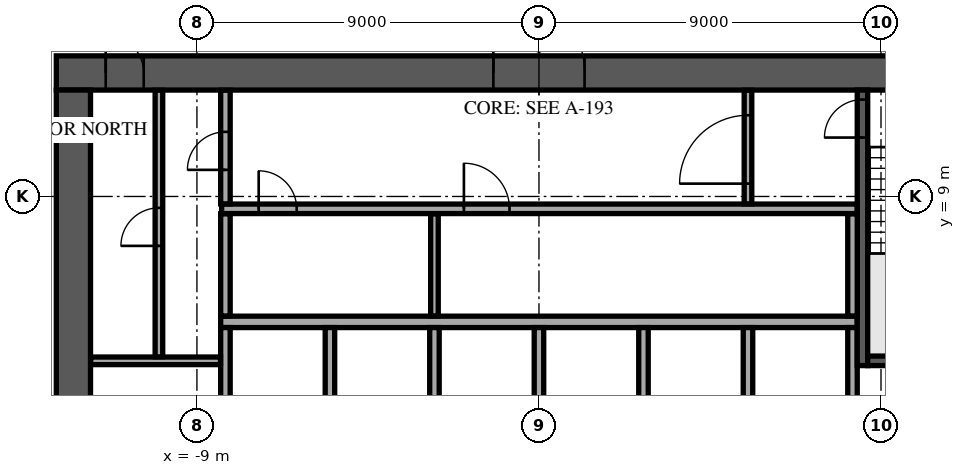
"""IFC4 building model, lengths in metres.
Left out: names, types, materials, properties, quantities, classifications, styles, units other than length and angle.
Written with IfcOpenShell. Run it as: python <this file> out.ifc"""

import sys

from ifc_helpers import new_model, si_unit, direction, frame, frame_2d, origin, place, context, subcontext, project, spatial, rectangle, extrude, element, fill, save


model = new_model("IFC4")
c1 = context("Model", 3, precision=1e-05, world=origin(), true_north=direction((0.0, 1.0)))
c2 = subcontext(c1, "Body", "Model", "MODEL_VIEW")
j1 = project(units=[si_unit("LENGTHUNIT", "METRE"), si_unit("PLANEANGLEUNIT", "RADIAN")], contexts=[c1])
p1 = place(None, origin())
s1 = spatial("IfcSite", under=j1, at=p1, CompositionType="ELEMENT")
p2 = place(p1, origin())
s2 = spatial("IfcBuilding", under=s1, at=p2, CompositionType="ELEMENT")
p3 = place(p2, frame((0.0, 0.0, 225.3)))
s3 = spatial("IfcBuildingStorey", under=s2, at=p3, CompositionType="ELEMENT", Elevation=225.3)
p4 = place(p3, frame((-12.7, 12.25, 0.0), z_axis=(0.0, 0.0, 1.0), x_axis=(1.0, 0.0, 0.0)))
e1 = element("IfcWall", 1, at=p4, inside=s3, PredefinedType="SHEAR", context=c2, shape_type="SweptSolid", body=[
    extrude(rectangle(XDim=25.4, YDim=0.9, at=frame_2d((12.7, 0.0))), origin(), (0.0, 0.0, 1.0), 3.62),
])
p5 = place(p4, frame((11.5, 0.0, 0.0)))
e2 = element("IfcOpeningElement", 2, at=p5, cuts=e1, PredefinedType="OPENING", context=c2, shape_type="SweptSolid", body=[
    extrude(rectangle(XDim=2.4, YDim=2.4, at=frame_2d((1.2, 1.2))), frame((0.0, 0.46, 0.0), z_axis=(0.0, -1.0, 0.0), x_axis=(1.0, 0.0, 0.0)), (0.0, 0.0, 1.0), 0.92),
])
p6 = place(p4, frame((22.325, 0.0, 0.0)))
e3 = element("IfcOpeningElement", 3, at=p6, cuts=e1, PredefinedType="OPENING", context=c2, shape_type="SweptSolid", body=[
    extrude(rectangle(XDim=1.2, YDim=2.1, at=frame_2d((0.6, 1.05))), frame((0.0, 0.46, 0.0), z_axis=(0.0, -1.0, 0.0), x_axis=(1.0, 0.0, 0.0)), (0.0, 0.0, 1.0), 0.92),
])
p7 = place(p4, frame((1.3, 0.0, 0.0)))
e4 = element("IfcOpeningElement", 4, at=p7, cuts=e1, PredefinedType="OPENING", context=c2, shape_type="SweptSolid", body=[
    extrude(rectangle(XDim=1.0, YDim=2.1, at=frame_2d((0.5, 1.05))), frame((0.0, 0.46, 0.0), z_axis=(0.0, -1.0, 0.0), x_axis=(1.0, 0.0, 0.0)), (0.0, 0.0, 1.0), 0.92),
])
p8 = place(p3, frame((-12.25, -11.8, 0.0), z_axis=(0.0, 0.0, 1.0), x_axis=(0.0, 1.0, 0.0)))
e5 = element("IfcWall", 5, at=p8, inside=s3, PredefinedType="SHEAR", context=c2, shape_type="SweptSolid", body=[
    extrude(rectangle(XDim=23.6, YDim=0.9, at=frame_2d((11.8, 0.0))), origin(), (0.0, 0.0, 1.0), 3.62),
])
p9 = place(p8, frame((10.6, 0.0, 0.0)))
e6 = element("IfcOpeningElement", 6, at=p9, cuts=e5, PredefinedType="OPENING", context=c2, shape_type="SweptSolid", body=[
    extrude(rectangle(XDim=2.4, YDim=2.4, at=frame_2d((1.2, 1.2))), frame((0.0, 0.46, 0.0), z_axis=(0.0, -1.0, 0.0), x_axis=(1.0, 0.0, 0.0)), (0.0, 0.0, 1.0), 0.92),
])
p10 = place(p3, frame((-8.375, 5.7, 0.0), z_axis=(0.0, 0.0, 1.0), x_axis=(1.0, 0.0, 0.0)))
e7 = element("IfcWall", 7, at=p10, inside=s3, PredefinedType="SOLIDWALL", context=c2, shape_type="SweptSolid", body=[
    extrude(rectangle(XDim=16.75, YDim=0.3, at=frame_2d((8.375, 0.0))), origin(), (0.0, 0.0, 1.0), 3.62),
])
for number, where, z_axis, x_axis in (
    (8, (-8.25, 2.85, 0.0), (0.0, 0.0, 1.0), (0.0, 1.0, 0.0)),
    (9, (-5.5, 2.85, 0.0), (0.0, 0.0, 1.0), (0.0, 1.0, 0.0)),
    (10, (-2.75, 2.85, 0.0), (0.0, 0.0, 1.0), (0.0, 1.0, 0.0)),
    (11, (0.0, 2.85, 0.0), (0.0, 0.0, 1.0), (0.0, 1.0, 0.0)),
    (12, (2.75, 2.85, 0.0), (0.0, 0.0, 1.0), (0.0, 1.0, 0.0)),
    (13, (5.5, 2.85, 0.0), (0.0, 0.0, 1.0), (0.0, 1.0, 0.0)),
    (14, (8.25, 2.85, 0.0), (0.0, 0.0, 1.0), (0.0, 1.0, 0.0)),
):
    element("IfcWall", number, at=place(p3, frame(where, z_axis=z_axis, x_axis=x_axis)), inside=s3, PredefinedType="SOLIDWALL", context=c2, shape_type="SweptSolid", body=[
        extrude(rectangle(XDim=2.7, YDim=0.25, at=frame_2d((1.35, 0.0))), origin(), (0.0, 0.0, 1.0), 3.62),
    ])
p11 = place(p3, frame((8.512, 4.55, 0.0), z_axis=(0.0, 0.0, 1.0), x_axis=(0.0, 1.0, 0.0)))
e15 = element("IfcWall", 15, at=p11, inside=s3, PredefinedType="SOLIDWALL", context=c2, shape_type="SweptSolid", body=[
    extrude(rectangle(XDim=7.25, YDim=0.275, at=frame_2d((3.625, 0.0))), origin(), (0.0, 0.0, 1.0), 3.62),
])
p12 = place(p11, frame((6.0, 0.0, 0.0)))
e16 = element("IfcOpeningElement", 16, at=p12, cuts=e15, PredefinedType="OPENING", context=c2, shape_type="SweptSolid", body=[
    extrude(rectangle(XDim=1.0, YDim=2.1, at=frame_2d((0.5, 1.05))), frame((0.0, 0.147, 0.0), z_axis=(0.0, -1.0, 0.0), x_axis=(1.0, 0.0, 0.0)), (0.0, 0.0, 1.0), 0.295),
])
p13 = place(p3, frame((8.65, 4.675, 0.0), z_axis=(0.0, 0.0, 1.0), x_axis=(1.0, 0.0, 0.0)))
e17 = element("IfcWall", 17, at=p13, inside=s3, PredefinedType="SOLIDWALL", context=c2, shape_type="SweptSolid", body=[
    extrude(rectangle(XDim=3.15, YDim=0.25, at=frame_2d((1.575, 0.0))), origin(), (0.0, 0.0, 1.0), 3.62),
])
p14 = place(p3, frame((-11.795, 4.675, 0.0), z_axis=(0.0, 0.0, 1.0), x_axis=(1.0, 0.0, 0.0)))
e18 = element("IfcWall", 18, at=p14, inside=s3, PredefinedType="PARTITIONING", context=c2, shape_type="SweptSolid", body=[
    extrude(rectangle(XDim=3.415, YDim=0.2, at=frame_2d((1.708, 0.0))), origin(), (0.0, 0.0, 1.0), 3.62),
])
p15 = place(p3, frame((-10.0, 4.78, 0.0), z_axis=(0.0, 0.0, 1.0), x_axis=(0.0, 1.0, 0.0)))
e19 = element("IfcWall", 19, at=p15, inside=s3, PredefinedType="PARTITIONING", context=c2, shape_type="SweptSolid", body=[
    extrude(rectangle(XDim=7.015, YDim=0.2, at=frame_2d((3.507, 0.0))), origin(), (0.0, 0.0, 1.0), 3.62),
])
p16 = place(p15, frame((2.92, 0.0, 0.0)))
e20 = element("IfcOpeningElement", 20, at=p16, cuts=e19, PredefinedType="OPENING", context=c2, shape_type="SweptSolid", body=[
    extrude(rectangle(XDim=1.0, YDim=2.1, at=frame_2d((0.5, 1.05))), frame((0.0, 0.11, 0.0), z_axis=(0.0, -1.0, 0.0), x_axis=(1.0, 0.0, 0.0)), (0.0, 0.0, 1.0), 0.22),
])
p17 = place(p3, frame((-8.25, 5.855, 0.0), z_axis=(0.0, 0.0, 1.0), x_axis=(0.0, 1.0, 0.0)))
e21 = element("IfcWall", 21, at=p17, inside=s3, PredefinedType="PARTITIONING", context=c2, shape_type="SweptSolid", body=[
    extrude(rectangle(XDim=2.69, YDim=0.25, at=frame_2d((1.345, 0.0))), origin(), (0.0, 0.0, 1.0), 3.62),
])
p18 = place(p3, frame((-2.75, 5.855, 0.0), z_axis=(0.0, 0.0, 1.0), x_axis=(0.0, 1.0, 0.0)))
e22 = element("IfcWall", 22, at=p18, inside=s3, PredefinedType="PARTITIONING", context=c2, shape_type="SweptSolid", body=[
    extrude(rectangle(XDim=2.69, YDim=0.2, at=frame_2d((1.345, 0.0))), origin(), (0.0, 0.0, 1.0), 3.62),
])
p19 = place(p3, frame((8.25, 5.855, 0.0), z_axis=(0.0, 0.0, 1.0), x_axis=(0.0, 1.0, 0.0)))
e23 = element("IfcWall", 23, at=p19, inside=s3, PredefinedType="PARTITIONING", context=c2, shape_type="SweptSolid", body=[
    extrude(rectangle(XDim=2.69, YDim=0.25, at=frame_2d((1.345, 0.0))), origin(), (0.0, 0.0, 1.0), 3.62),
])
p20 = place(p3, frame((-8.35, 8.675, 0.0), z_axis=(0.0, 0.0, 1.0), x_axis=(1.0, 0.0, 0.0)))
e24 = element("IfcWall", 24, at=p20, inside=s3, PredefinedType="PARTITIONING", context=c2, shape_type="SweptSolid", body=[
    extrude(rectangle(XDim=16.72, YDim=0.25, at=frame_2d((8.36, 0.0))), origin(), (0.0, 0.0, 1.0), 3.62),
])
p21 = place(p20, frame((0.975, 0.0, 0.0)))
e25 = element("IfcOpeningElement", 25, at=p21, cuts=e24, PredefinedType="OPENING", context=c2, shape_type="SweptSolid", body=[
    extrude(rectangle(XDim=1.0, YDim=2.1, at=frame_2d((0.5, 1.05))), frame((0.0, 0.135, 0.0), z_axis=(0.0, -1.0, 0.0), x_axis=(1.0, 0.0, 0.0)), (0.0, 0.0, 1.0), 0.27),
])
p22 = place(p20, frame((6.375, 0.0, 0.0)))
e26 = element("IfcOpeningElement", 26, at=p22, cuts=e24, PredefinedType="OPENING", context=c2, shape_type="SweptSolid", body=[
    extrude(rectangle(XDim=1.2, YDim=2.1, at=frame_2d((0.6, 1.05))), frame((0.0, 0.135, 0.0), z_axis=(0.0, -1.0, 0.0), x_axis=(1.0, 0.0, 0.0)), (0.0, 0.0, 1.0), 0.27),
])
p23 = place(p3, frame((-8.25, 8.805, 0.0), z_axis=(0.0, 0.0, 1.0), x_axis=(0.0, 1.0, 0.0)))
e27 = element("IfcWall", 27, at=p23, inside=s3, PredefinedType="PARTITIONING", context=c2, shape_type="SweptSolid", body=[
    extrude(rectangle(XDim=2.99, YDim=0.25, at=frame_2d((1.495, 0.0))), origin(), (0.0, 0.0, 1.0), 3.62),
])
p24 = place(p23, frame((0.895, 0.0, 0.0)))
e28 = element("IfcOpeningElement", 28, at=p24, cuts=e27, PredefinedType="OPENING", context=c2, shape_type="SweptSolid", body=[
    extrude(rectangle(XDim=1.0, YDim=2.1, at=frame_2d((0.5, 1.05))), frame((0.0, 0.135, 0.0), z_axis=(0.0, -1.0, 0.0), x_axis=(1.0, 0.0, 0.0)), (0.0, 0.0, 1.0), 0.27),
])
p25 = place(p3, frame((5.5, 8.805, 0.0), z_axis=(0.0, 0.0, 1.0), x_axis=(0.0, 1.0, 0.0)))
e29 = element("IfcWall", 29, at=p25, inside=s3, PredefinedType="PARTITIONING", context=c2, shape_type="SweptSolid", body=[
    extrude(rectangle(XDim=2.99, YDim=0.2, at=frame_2d((1.495, 0.0))), origin(), (0.0, 0.0, 1.0), 3.62),
])
p26 = place(p25, frame((0.532, 0.0, 0.0)))
e30 = element("IfcOpeningElement", 30, at=p26, cuts=e29, PredefinedType="OPENING", context=c2, shape_type="SweptSolid", body=[
    extrude(rectangle(XDim=1.8, YDim=2.1, at=frame_2d((0.9, 1.05))), frame((0.0, 0.11, 0.0), z_axis=(0.0, -1.0, 0.0), x_axis=(1.0, 0.0, 0.0)), (0.0, 0.0, 1.0), 0.22),
])
p27 = place(p3, frame((-3.777, 34.584, 0.0), z_axis=(0.0, 0.0, 1.0), x_axis=(-0.629323778295, -0.777143218508, 0.0)))
e31 = element("IfcWall", 31, at=p27, inside=s3, PredefinedType="STANDARD", context=c2, shape_type="SweptSolid", body=[
    extrude(rectangle(XDim=49.0, YDim=0.6, at=frame_2d((24.5, 0.0))), origin(), (0.0, 0.0, 1.0), 3.62),
])
p28 = place(p27, frame((1.227, 0.0, 0.9)))
e32 = element("IfcOpeningElement", 32, at=p28, cuts=e31, PredefinedType="OPENING", context=c2, shape_type="SweptSolid", body=[
    extrude(rectangle(XDim=2.0, YDim=2.1, at=frame_2d((1.0, 1.05))), frame((0.0, 0.31, 0.0), z_axis=(0.0, -1.0, 0.0), x_axis=(1.0, 0.0, 0.0)), (0.0, 0.0, 1.0), 0.62),
])
p29 = place(p27, frame((5.682, 0.0, 0.9)))
e33 = element("IfcOpeningElement", 33, at=p29, cuts=e31, PredefinedType="OPENING", context=c2, shape_type="SweptSolid", body=[
    extrude(rectangle(XDim=2.0, YDim=2.1, at=frame_2d((1.0, 1.05))), frame((0.0, 0.31, 0.0), z_axis=(0.0, -1.0, 0.0), x_axis=(1.0, 0.0, 0.0)), (0.0, 0.0, 1.0), 0.62),
])
p30 = place(p27, frame((10.136, 0.0, 0.9)))
e34 = element("IfcOpeningElement", 34, at=p30, cuts=e31, PredefinedType="OPENING", context=c2, shape_type="SweptSolid", body=[
    extrude(rectangle(XDim=2.0, YDim=2.1, at=frame_2d((1.0, 1.05))), frame((0.0, 0.31, 0.0), z_axis=(0.0, -1.0, 0.0), x_axis=(1.0, 0.0, 0.0)), (0.0, 0.0, 1.0), 0.62),
])
p31 = place(p27, frame((14.591, 0.0, 0.9)))
e35 = element("IfcOpeningElement", 35, at=p31, cuts=e31, PredefinedType="OPENING", context=c2, shape_type="SweptSolid", body=[
    extrude(rectangle(XDim=2.0, YDim=2.1, at=frame_2d((1.0, 1.05))), frame((0.0, 0.31, 0.0), z_axis=(0.0, -1.0, 0.0), x_axis=(1.0, 0.0, 0.0)), (0.0, 0.0, 1.0), 0.62),
])
p32 = place(p27, frame((19.045, 0.0, 0.9)))
e36 = element("IfcOpeningElement", 36, at=p32, cuts=e31, PredefinedType="OPENING", context=c2, shape_type="SweptSolid", body=[
    extrude(rectangle(XDim=2.0, YDim=2.1, at=frame_2d((1.0, 1.05))), frame((0.0, 0.31, 0.0), z_axis=(0.0, -1.0, 0.0), x_axis=(1.0, 0.0, 0.0)), (0.0, 0.0, 1.0), 0.62),
])
p33 = place(p27, frame((23.5, 0.0, 0.9)))
e37 = element("IfcOpeningElement", 37, at=p33, cuts=e31, PredefinedType="OPENING", context=c2, shape_type="SweptSolid", body=[
    extrude(rectangle(XDim=2.0, YDim=2.1, at=frame_2d((1.0, 1.05))), frame((0.0, 0.31, 0.0), z_axis=(0.0, -1.0, 0.0), x_axis=(1.0, 0.0, 0.0)), (0.0, 0.0, 1.0), 0.62),
])
p34 = place(p27, frame((27.955, 0.0, 0.9)))
e38 = element("IfcOpeningElement", 38, at=p34, cuts=e31, PredefinedType="OPENING", context=c2, shape_type="SweptSolid", body=[
    extrude(rectangle(XDim=2.0, YDim=2.1, at=frame_2d((1.0, 1.05))), frame((0.0, 0.31, 0.0), z_axis=(0.0, -1.0, 0.0), x_axis=(1.0, 0.0, 0.0)), (0.0, 0.0, 1.0), 0.62),
])
p35 = place(p27, frame((32.409, 0.0, 0.9)))
e39 = element("IfcOpeningElement", 39, at=p35, cuts=e31, PredefinedType="OPENING", context=c2, shape_type="SweptSolid", body=[
    extrude(rectangle(XDim=2.0, YDim=2.1, at=frame_2d((1.0, 1.05))), frame((0.0, 0.31, 0.0), z_axis=(0.0, -1.0, 0.0), x_axis=(1.0, 0.0, 0.0)), (0.0, 0.0, 1.0), 0.62),
])
p36 = place(p27, frame((36.864, 0.0, 0.9)))
e40 = element("IfcOpeningElement", 40, at=p36, cuts=e31, PredefinedType="OPENING", context=c2, shape_type="SweptSolid", body=[
    extrude(rectangle(XDim=2.0, YDim=2.1, at=frame_2d((1.0, 1.05))), frame((0.0, 0.31, 0.0), z_axis=(0.0, -1.0, 0.0), x_axis=(1.0, 0.0, 0.0)), (0.0, 0.0, 1.0), 0.62),
])
p37 = place(p27, frame((41.318, 0.0, 0.9)))
e41 = element("IfcOpeningElement", 41, at=p37, cuts=e31, PredefinedType="OPENING", context=c2, shape_type="SweptSolid", body=[
    extrude(rectangle(XDim=2.0, YDim=2.1, at=frame_2d((1.0, 1.05))), frame((0.0, 0.31, 0.0), z_axis=(0.0, -1.0, 0.0), x_axis=(1.0, 0.0, 0.0)), (0.0, 0.0, 1.0), 0.62),
])
p38 = place(p27, frame((45.773, 0.0, 0.9)))
e42 = element("IfcOpeningElement", 42, at=p38, cuts=e31, PredefinedType="OPENING", context=c2, shape_type="SweptSolid", body=[
    extrude(rectangle(XDim=2.0, YDim=2.1, at=frame_2d((1.0, 1.05))), frame((0.0, 0.31, 0.0), z_axis=(0.0, -1.0, 0.0), x_axis=(1.0, 0.0, 0.0)), (0.0, 0.0, 1.0), 0.62),
])
p39 = place(p3, frame((33.845, 10.81, 0.0), z_axis=(0.0, 0.0, 1.0), x_axis=(-0.777145437972, 0.629321037499, 0.0)))
e43 = element("IfcWall", 43, at=p39, inside=s3, PredefinedType="STANDARD", context=c2, shape_type="SweptSolid", body=[
    extrude(rectangle(XDim=39.0, YDim=0.6, at=frame_2d((19.5, 0.0))), origin(), (0.0, 0.0, 1.0), 3.62),
])
p40 = place(p39, frame((1.217, 0.0, 0.9)))
e44 = element("IfcOpeningElement", 44, at=p40, cuts=e43, PredefinedType="OPENING", context=c2, shape_type="SweptSolid", body=[
    extrude(rectangle(XDim=1.9, YDim=2.1, at=frame_2d((0.95, 1.05))), frame((0.0, 0.31, 0.0), z_axis=(0.0, -1.0, 0.0), x_axis=(1.0, 0.0, 0.0)), (0.0, 0.0, 1.0), 0.62),
])
p41 = place(p39, frame((5.55, 0.0, 0.9)))
e45 = element("IfcOpeningElement", 45, at=p41, cuts=e43, PredefinedType="OPENING", context=c2, shape_type="SweptSolid", body=[
    extrude(rectangle(XDim=1.9, YDim=2.1, at=frame_2d((0.95, 1.05))), frame((0.0, 0.31, 0.0), z_axis=(0.0, -1.0, 0.0), x_axis=(1.0, 0.0, 0.0)), (0.0, 0.0, 1.0), 0.62),
])
p42 = place(p39, frame((9.883, 0.0, 0.9)))
e46 = element("IfcOpeningElement", 46, at=p42, cuts=e43, PredefinedType="OPENING", context=c2, shape_type="SweptSolid", body=[
    extrude(rectangle(XDim=1.9, YDim=2.1, at=frame_2d((0.95, 1.05))), frame((0.0, 0.31, 0.0), z_axis=(0.0, -1.0, 0.0), x_axis=(1.0, 0.0, 0.0)), (0.0, 0.0, 1.0), 0.62),
])
p43 = place(p39, frame((14.217, 0.0, 0.9)))
e47 = element("IfcOpeningElement", 47, at=p43, cuts=e43, PredefinedType="OPENING", context=c2, shape_type="SweptSolid", body=[
    extrude(rectangle(XDim=1.9, YDim=2.1, at=frame_2d((0.95, 1.05))), frame((0.0, 0.31, 0.0), z_axis=(0.0, -1.0, 0.0), x_axis=(1.0, 0.0, 0.0)), (0.0, 0.0, 1.0), 0.62),
])
p44 = place(p39, frame((18.55, 0.0, 0.9)))
e48 = element("IfcOpeningElement", 48, at=p44, cuts=e43, PredefinedType="OPENING", context=c2, shape_type="SweptSolid", body=[
    extrude(rectangle(XDim=1.9, YDim=2.1, at=frame_2d((0.95, 1.05))), frame((0.0, 0.31, 0.0), z_axis=(0.0, -1.0, 0.0), x_axis=(1.0, 0.0, 0.0)), (0.0, 0.0, 1.0), 0.62),
])
p45 = place(p39, frame((22.883, 0.0, 0.9)))
e49 = element("IfcOpeningElement", 49, at=p45, cuts=e43, PredefinedType="OPENING", context=c2, shape_type="SweptSolid", body=[
    extrude(rectangle(XDim=1.9, YDim=2.1, at=frame_2d((0.95, 1.05))), frame((0.0, 0.31, 0.0), z_axis=(0.0, -1.0, 0.0), x_axis=(1.0, 0.0, 0.0)), (0.0, 0.0, 1.0), 0.62),
])
p46 = place(p39, frame((27.217, 0.0, 0.9)))
e50 = element("IfcOpeningElement", 50, at=p46, cuts=e43, PredefinedType="OPENING", context=c2, shape_type="SweptSolid", body=[
    extrude(rectangle(XDim=1.9, YDim=2.1, at=frame_2d((0.95, 1.05))), frame((0.0, 0.31, 0.0), z_axis=(0.0, -1.0, 0.0), x_axis=(1.0, 0.0, 0.0)), (0.0, 0.0, 1.0), 0.62),
])
p47 = place(p39, frame((31.55, 0.0, 0.9)))
e51 = element("IfcOpeningElement", 51, at=p47, cuts=e43, PredefinedType="OPENING", context=c2, shape_type="SweptSolid", body=[
    extrude(rectangle(XDim=1.9, YDim=2.1, at=frame_2d((0.95, 1.05))), frame((0.0, 0.31, 0.0), z_axis=(0.0, -1.0, 0.0), x_axis=(1.0, 0.0, 0.0)), (0.0, 0.0, 1.0), 0.62),
])
p48 = place(p39, frame((35.883, 0.0, 0.9)))
e52 = element("IfcOpeningElement", 52, at=p48, cuts=e43, PredefinedType="OPENING", context=c2, shape_type="SweptSolid", body=[
    extrude(rectangle(XDim=1.9, YDim=2.1, at=frame_2d((0.95, 1.05))), frame((0.0, 0.31, 0.0), z_axis=(0.0, -1.0, 0.0), x_axis=(1.0, 0.0, 0.0)), (0.0, 0.0, 1.0), 0.62),
])
p49 = place(p3, frame((-26.769, -2.487, 0.0), z_axis=(0.0, 0.0, 1.0), x_axis=(0.629320703929, 0.777145708092, 0.0)))
e53 = element("IfcWall", 53, at=p49, inside=s3, PredefinedType="PARTITIONING", context=c2, shape_type="SweptSolid", body=[
    extrude(rectangle(XDim=37.558, YDim=0.15, at=frame_2d((18.779, 0.0))), origin(), (0.0, 0.0, 1.0), 2.97),
])
p50 = place(p49, frame((3.55, 0.0, 0.0)))
e54 = element("IfcOpeningElement", 54, at=p50, cuts=e53, PredefinedType="OPENING", context=c2, shape_type="SweptSolid", body=[
    extrude(rectangle(XDim=1.0, YDim=2.1, at=frame_2d((0.5, 1.05))), frame((0.0, 0.085, 0.0), z_axis=(0.0, -1.0, 0.0), x_axis=(1.0, 0.0, 0.0)), (0.0, 0.0, 1.0), 0.17),
])
p51 = place(p49, frame((11.862, 0.0, 0.0)))
e55 = element("IfcOpeningElement", 55, at=p51, cuts=e53, PredefinedType="OPENING", context=c2, shape_type="SweptSolid", body=[
    extrude(rectangle(XDim=1.0, YDim=2.1, at=frame_2d((0.5, 1.05))), frame((0.0, 0.085, 0.0), z_axis=(0.0, -1.0, 0.0), x_axis=(1.0, 0.0, 0.0)), (0.0, 0.0, 1.0), 0.17),
])
p52 = place(p49, frame((21.452, 0.0, 0.0)))
e56 = element("IfcOpeningElement", 56, at=p52, cuts=e53, PredefinedType="OPENING", context=c2, shape_type="SweptSolid", body=[
    extrude(rectangle(XDim=1.0, YDim=2.1, at=frame_2d((0.5, 1.05))), frame((0.0, 0.085, 0.0), z_axis=(0.0, -1.0, 0.0), x_axis=(1.0, 0.0, 0.0)), (0.0, 0.0, 1.0), 0.17),
])
p53 = place(p49, frame((31.223, 0.0, 0.0)))
e57 = element("IfcOpeningElement", 57, at=p53, cuts=e53, PredefinedType="OPENING", context=c2, shape_type="SweptSolid", body=[
    extrude(rectangle(XDim=1.0, YDim=2.1, at=frame_2d((0.5, 1.05))), frame((0.0, 0.085, 0.0), z_axis=(0.0, -1.0, 0.0), x_axis=(1.0, 0.0, 0.0)), (0.0, 0.0, 1.0), 0.17),
])
p54 = place(p49, frame((35.359, 0.0, 0.0)))
e58 = element("IfcOpeningElement", 58, at=p54, cuts=e53, PredefinedType="OPENING", context=c2, shape_type="SweptSolid", body=[
    extrude(rectangle(XDim=1.0, YDim=2.1, at=frame_2d((0.5, 1.05))), frame((0.0, 0.085, 0.0), z_axis=(0.0, -1.0, 0.0), x_axis=(1.0, 0.0, 0.0)), (0.0, 0.0, 1.0), 0.17),
])
p55 = place(p3, frame((3.616, 25.688, 0.0), z_axis=(0.0, 0.0, 1.0), x_axis=(0.777137029952, -0.62933142038, 0.0)))
e59 = element("IfcWall", 59, at=p55, inside=s3, PredefinedType="PARTITIONING", context=c2, shape_type="SweptSolid", body=[
    extrude(rectangle(XDim=26.785, YDim=0.15, at=frame_2d((13.393, 0.0))), origin(), (0.0, 0.0, 1.0), 3.17),
])
p56 = place(p55, frame((12.682, 0.0, 0.0)))
e60 = element("IfcOpeningElement", 60, at=p56, cuts=e59, PredefinedType="OPENING", context=c2, shape_type="SweptSolid", body=[
    extrude(rectangle(XDim=1.0, YDim=2.1, at=frame_2d((0.5, 1.05))), frame((0.0, 0.085, 0.0), z_axis=(0.0, -1.0, 0.0), x_axis=(1.0, 0.0, 0.0)), (0.0, 0.0, 1.0), 0.17),
])
p57 = place(p55, frame((16.597, 0.0, 0.0)))
e61 = element("IfcOpeningElement", 61, at=p57, cuts=e59, PredefinedType="OPENING", context=c2, shape_type="SweptSolid", body=[
    extrude(rectangle(XDim=1.0, YDim=2.1, at=frame_2d((0.5, 1.05))), frame((0.0, 0.085, 0.0), z_axis=(0.0, -1.0, 0.0), x_axis=(1.0, 0.0, 0.0)), (0.0, 0.0, 1.0), 0.17),
])
p58 = place(p5, origin())
e62 = element("IfcDoor", 62, at=p58, inside=s3, OperationType="SINGLE_SWING_LEFT", PredefinedType="DOOR", context=c2, shape_type="SweptSolid", body=[
    extrude(rectangle(XDim=2.4, YDim=2.4, at=frame_2d((1.2, 1.2))), frame((0.0, 0.025, 0.0), z_axis=(0.0, -1.0, 0.0), x_axis=(1.0, 0.0, 0.0)), (0.0, 0.0, 1.0), 0.05),
])
fill(e2, e62)
p59 = place(p7, origin())
e63 = element("IfcDoor", 63, at=p59, inside=s3, OperationType="SINGLE_SWING_LEFT", PredefinedType="DOOR", context=c2, shape_type="SweptSolid", body=[
    extrude(rectangle(XDim=1.0, YDim=2.1, at=frame_2d((0.5, 1.05))), frame((0.0, 0.025, 0.0), z_axis=(0.0, -1.0, 0.0), x_axis=(1.0, 0.0, 0.0)), (0.0, 0.0, 1.0), 0.05),
])
fill(e4, e63)
p60 = place(p12, origin())
e64 = element("IfcDoor", 64, at=p60, inside=s3, OperationType="SINGLE_SWING_LEFT", PredefinedType="DOOR", context=c2, shape_type="SweptSolid", body=[
    extrude(rectangle(XDim=1.0, YDim=2.1, at=frame_2d((0.5, 1.05))), frame((0.0, 0.025, 0.0), z_axis=(0.0, -1.0, 0.0), x_axis=(1.0, 0.0, 0.0)), (0.0, 0.0, 1.0), 0.05),
])
fill(e16, e64)
p61 = place(p16, origin())
e65 = element("IfcDoor", 65, at=p61, inside=s3, OperationType="SINGLE_SWING_RIGHT", PredefinedType="DOOR", context=c2, shape_type="SweptSolid", body=[
    extrude(rectangle(XDim=1.0, YDim=2.1, at=frame_2d((0.5, 1.05))), frame((0.0, 0.025, 0.0), z_axis=(0.0, -1.0, 0.0), x_axis=(1.0, 0.0, 0.0)), (0.0, 0.0, 1.0), 0.05),
])
fill(e20, e65)
p62 = place(p24, origin())
e66 = element("IfcDoor", 66, at=p62, inside=s3, OperationType="SINGLE_SWING_RIGHT", PredefinedType="DOOR", context=c2, shape_type="SweptSolid", body=[
    extrude(rectangle(XDim=1.0, YDim=2.1, at=frame_2d((0.5, 1.05))), frame((0.0, 0.025, 0.0), z_axis=(0.0, -1.0, 0.0), x_axis=(1.0, 0.0, 0.0)), (0.0, 0.0, 1.0), 0.05),
])
fill(e28, e66)
p63 = place(p21, origin())
e67 = element("IfcDoor", 67, at=p63, inside=s3, OperationType="SINGLE_SWING_RIGHT", PredefinedType="DOOR", context=c2, shape_type="SweptSolid", body=[
    extrude(rectangle(XDim=1.0, YDim=2.1, at=frame_2d((0.5, 1.05))), frame((0.0, 0.025, 0.0), z_axis=(0.0, -1.0, 0.0), x_axis=(1.0, 0.0, 0.0)), (0.0, 0.0, 1.0), 0.05),
])
fill(e25, e67)
p64 = place(p22, origin())
e68 = element("IfcDoor", 68, at=p64, inside=s3, OperationType="SINGLE_SWING_LEFT", PredefinedType="DOOR", context=c2, shape_type="SweptSolid", body=[
    extrude(rectangle(XDim=1.2, YDim=2.1, at=frame_2d((0.6, 1.05))), frame((0.0, 0.025, 0.0), z_axis=(0.0, -1.0, 0.0), x_axis=(1.0, 0.0, 0.0)), (0.0, 0.0, 1.0), 0.05),
])
fill(e26, e68)
p65 = place(p26, origin())
e69 = element("IfcDoor", 69, at=p65, inside=s3, OperationType="SINGLE_SWING_LEFT", PredefinedType="DOOR", context=c2, shape_type="SweptSolid", body=[
    extrude(rectangle(XDim=1.8, YDim=2.1, at=frame_2d((0.9, 1.05))), frame((0.0, 0.025, 0.0), z_axis=(0.0, -1.0, 0.0), x_axis=(1.0, 0.0, 0.0)), (0.0, 0.0, 1.0), 0.05),
])
fill(e30, e69)
save(model, sys.argv[1])
